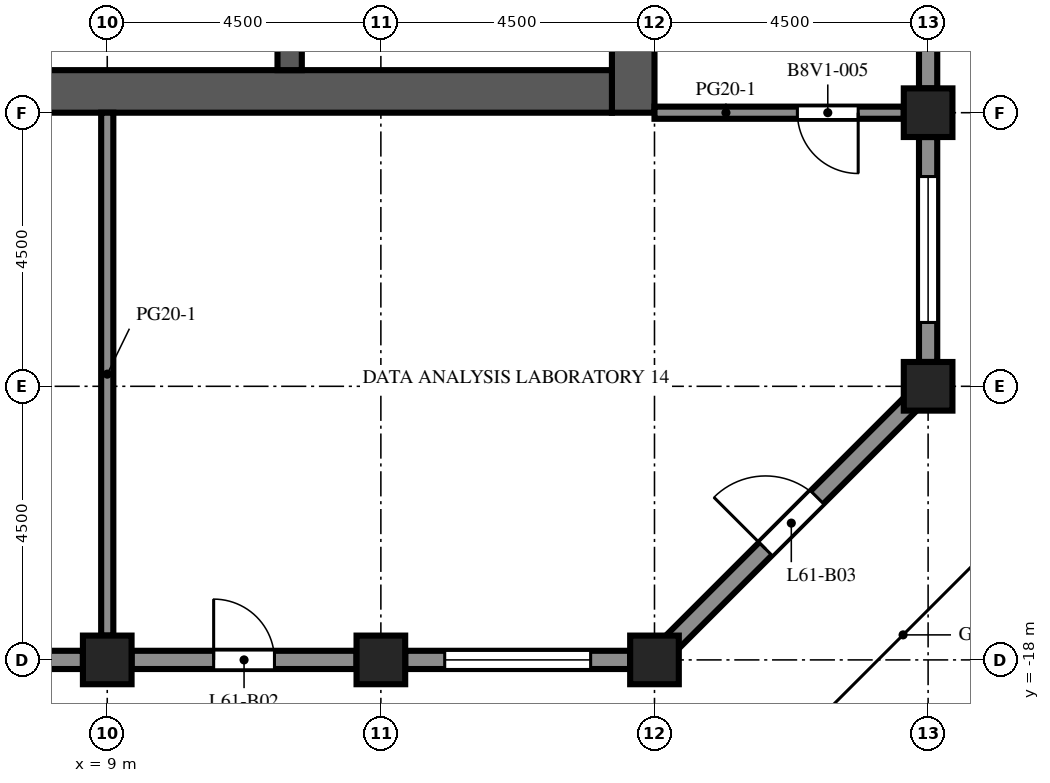
"""IFC4 building model, lengths in metres.
Left out: names, types, materials, properties, quantities, classifications, styles, units other than length and angle.
Written with IfcOpenShell. Run it as: python <this file> out.ifc"""

import sys

from ifc_helpers import new_model, si_unit, direction, frame, frame_2d, origin, origin_2d, place, context, subcontext, project, spatial, rectangle, extrude, element, fill, save


model = new_model("IFC4")
c1 = context("Model", 3, precision=1e-05, world=origin(), true_north=direction((0.0, 1.0)))
c2 = subcontext(c1, "Body", "Model", "MODEL_VIEW")
j1 = project(units=[si_unit("LENGTHUNIT", "METRE"), si_unit("PLANEANGLEUNIT", "RADIAN")], contexts=[c1])
p1 = place(None, origin())
s1 = spatial("IfcSite", under=j1, at=p1, CompositionType="ELEMENT")
p2 = place(p1, origin())
s2 = spatial("IfcBuilding", under=s1, at=p2, CompositionType="ELEMENT")
p3 = place(p2, frame((0.0, 0.0, 270.4)))
s3 = spatial("IfcBuildingStorey", under=s2, at=p3, CompositionType="ELEMENT", Elevation=270.4)
for number, where, z_axis, x_axis in (
    (1, (9.0, -18.0, 0.0), (0.0, 0.0, 1.0), (1.0, 0.0, 0.0)),
    (2, (13.5, -18.0, 0.0), (0.0, 0.0, 1.0), (1.0, 0.0, 0.0)),
    (3, (18.0, -18.0, 0.0), (0.0, 0.0, 1.0), (1.0, 0.0, 0.0)),
    (4, (22.5, -13.5, 0.0), (0.0, 0.0, 1.0), (1.0, 0.0, 0.0)),
    (5, (22.5, -9.0, 0.0), (0.0, 0.0, 1.0), (1.0, 0.0, 0.0)),
):
    element("IfcColumn", number, at=place(p3, frame(where, z_axis=z_axis, x_axis=x_axis)), inside=s3, PredefinedType="COLUMN", context=c2, shape_type="SweptSolid", body=[
        extrude(rectangle(XDim=0.8, YDim=0.8, at=origin_2d()), origin(), (0.0, 0.0, 1.0), 4.1),
    ])
p4 = place(p3, frame((17.65, -9.0, 0.0), z_axis=(0.0, 0.0, 1.0), x_axis=(0.0, 1.0, 0.0)))
e6 = element("IfcWall", 6, at=p4, inside=s3, PredefinedType="SHEAR", context=c2, shape_type="SweptSolid", body=[
    extrude(rectangle(XDim=27.5, YDim=0.7, at=frame_2d((13.75, 0.0))), origin(), (0.0, 0.0, 1.0), 4.1),
])
p5 = place(p4, frame((12.55, 0.0, 0.0)))
e7 = element("IfcOpeningElement", 7, at=p5, cuts=e6, PredefinedType="OPENING", context=c2, shape_type="SweptSolid", body=[
    extrude(rectangle(XDim=2.4, YDim=2.4, at=frame_2d((1.2, 1.2))), frame((0.0, 0.36, 0.0), z_axis=(0.0, -1.0, 0.0), x_axis=(1.0, 0.0, 0.0)), (0.0, 0.0, 1.0), 0.72),
])
p6 = place(p4, frame((6.825, 0.0, 0.0)))
e8 = element("IfcOpeningElement", 8, at=p6, cuts=e6, PredefinedType="OPENING", context=c2, shape_type="SweptSolid", body=[
    extrude(rectangle(XDim=1.2, YDim=2.1, at=frame_2d((0.6, 1.05))), frame((0.0, 0.36, 0.0), z_axis=(0.0, -1.0, 0.0), x_axis=(1.0, 0.0, 0.0)), (0.0, 0.0, 1.0), 0.72),
])
p7 = place(p4, frame((19.475, 0.0, 0.0)))
e9 = element("IfcOpeningElement", 9, at=p7, cuts=e6, PredefinedType="OPENING", context=c2, shape_type="SweptSolid", body=[
    extrude(rectangle(XDim=1.2, YDim=2.1, at=frame_2d((0.6, 1.05))), frame((0.0, 0.36, 0.0), z_axis=(0.0, -1.0, 0.0), x_axis=(1.0, 0.0, 0.0)), (0.0, 0.0, 1.0), 0.72),
])
p8 = place(p3, frame((6.7, -8.65, 0.0), z_axis=(0.0, 0.0, 1.0), x_axis=(1.0, 0.0, 0.0)))
e10 = element("IfcWall", 10, at=p8, inside=s3, PredefinedType="SHEAR", context=c2, shape_type="SweptSolid", body=[
    extrude(rectangle(XDim=10.6, YDim=0.7, at=frame_2d((5.3, 0.0))), origin(), (0.0, 0.0, 1.0), 4.1),
])
p9 = place(p3, frame((12.0, -8.3, 0.0), z_axis=(0.0, 0.0, 1.0), x_axis=(0.0, 1.0, 0.0)))
e11 = element("IfcWall", 11, at=p9, inside=s3, PredefinedType="SHEAR", context=c2, shape_type="SweptSolid", body=[
    extrude(rectangle(XDim=7.6, YDim=0.4, at=frame_2d((3.8, 0.0))), origin(), (0.0, 0.0, 1.0), 4.1),
])
p10 = place(p3, frame((8.6, -18.0, 0.0), z_axis=(0.0, 0.0, 1.0), x_axis=(-1.0, 0.0, 0.0)))
e12 = element("IfcWall", 12, at=p10, inside=s3, PredefinedType="SOLIDWALL", context=c2, shape_type="SweptSolid", body=[
    extrude(rectangle(XDim=3.7, YDim=0.3, at=frame_2d((1.85, 0.0))), origin(), (0.0, 0.0, 1.0), 2.85),
])
p11 = place(p10, frame((0.65, 0.0, 0.8)))
e13 = element("IfcOpeningElement", 13, at=p11, cuts=e12, PredefinedType="OPENING", context=c2, shape_type="SweptSolid", body=[
    extrude(rectangle(XDim=2.4, YDim=1.7, at=frame_2d((1.2, 0.85))), frame((0.0, 0.16, 0.0), z_axis=(0.0, -1.0, 0.0), x_axis=(1.0, 0.0, 0.0)), (0.0, 0.0, 1.0), 0.32),
])
p12 = place(p3, frame((13.1, -18.0, 0.0), z_axis=(0.0, 0.0, 1.0), x_axis=(-1.0, 0.0, 0.0)))
e14 = element("IfcWall", 14, at=p12, inside=s3, PredefinedType="SOLIDWALL", context=c2, shape_type="SweptSolid", body=[
    extrude(rectangle(XDim=3.7, YDim=0.3, at=frame_2d((1.85, 0.0))), origin(), (0.0, 0.0, 1.0), 2.85),
])
p13 = place(p12, frame((1.35, 0.0, 0.0)))
e15 = element("IfcOpeningElement", 15, at=p13, cuts=e14, PredefinedType="OPENING", context=c2, shape_type="SweptSolid", body=[
    extrude(rectangle(XDim=1.0, YDim=2.2, at=frame_2d((0.5, 1.1))), frame((0.0, 0.16, 0.0), z_axis=(0.0, -1.0, 0.0), x_axis=(1.0, 0.0, 0.0)), (0.0, 0.0, 1.0), 0.32),
])
p14 = place(p3, frame((17.6, -18.0, 0.0), z_axis=(0.0, 0.0, 1.0), x_axis=(-1.0, 0.0, 0.0)))
e16 = element("IfcWall", 16, at=p14, inside=s3, PredefinedType="SOLIDWALL", context=c2, shape_type="SweptSolid", body=[
    extrude(rectangle(XDim=3.7, YDim=0.3, at=frame_2d((1.85, 0.0))), origin(), (0.0, 0.0, 1.0), 2.85),
])
p15 = place(p14, frame((0.65, 0.0, 0.8)))
e17 = element("IfcOpeningElement", 17, at=p15, cuts=e16, PredefinedType="OPENING", context=c2, shape_type="SweptSolid", body=[
    extrude(rectangle(XDim=2.4, YDim=1.7, at=frame_2d((1.2, 0.85))), frame((0.0, 0.16, 0.0), z_axis=(0.0, -1.0, 0.0), x_axis=(1.0, 0.0, 0.0)), (0.0, 0.0, 1.0), 0.32),
])
p16 = place(p3, frame((22.206, -13.794, 0.0), z_axis=(0.0, 0.0, 1.0), x_axis=(-0.707106781187, -0.707106781187, 0.0)))
e18 = element("IfcWall", 18, at=p16, inside=s3, PredefinedType="SOLIDWALL", context=c2, shape_type="SweptSolid", body=[
    extrude(rectangle(XDim=5.532, YDim=0.3, at=frame_2d((2.766, 0.0))), origin(), (0.0, 0.0, 1.0), 2.85),
])
p17 = place(p16, frame((2.166, 0.0, 0.0)))
e19 = element("IfcOpeningElement", 19, at=p17, cuts=e18, PredefinedType="OPENING", context=c2, shape_type="SweptSolid", body=[
    extrude(rectangle(XDim=1.2, YDim=2.2, at=frame_2d((0.6, 1.1))), frame((0.0, 0.16, 0.0), z_axis=(0.0, -1.0, 0.0), x_axis=(1.0, 0.0, 0.0)), (0.0, 0.0, 1.0), 0.32),
])
p18 = place(p3, frame((22.5, -9.4, 0.0), z_axis=(0.0, 0.0, 1.0), x_axis=(0.0, -1.0, 0.0)))
e20 = element("IfcWall", 20, at=p18, inside=s3, PredefinedType="SOLIDWALL", context=c2, shape_type="SweptSolid", body=[
    extrude(rectangle(XDim=3.7, YDim=0.3, at=frame_2d((1.85, 0.0))), origin(), (0.0, 0.0, 1.0), 2.85),
])
p19 = place(p18, frame((0.65, 0.0, 0.8)))
e21 = element("IfcOpeningElement", 21, at=p19, cuts=e20, PredefinedType="OPENING", context=c2, shape_type="SweptSolid", body=[
    extrude(rectangle(XDim=2.4, YDim=1.7, at=frame_2d((1.2, 0.85))), frame((0.0, 0.16, 0.0), z_axis=(0.0, -1.0, 0.0), x_axis=(1.0, 0.0, 0.0)), (0.0, 0.0, 1.0), 0.32),
])
p20 = place(p3, frame((22.5, -4.9, 0.0), z_axis=(0.0, 0.0, 1.0), x_axis=(0.0, -1.0, 0.0)))
e22 = element("IfcWall", 22, at=p20, inside=s3, PredefinedType="SOLIDWALL", context=c2, shape_type="SweptSolid", body=[
    extrude(rectangle(XDim=3.7, YDim=0.3, at=frame_2d((1.85, 0.0))), origin(), (0.0, 0.0, 1.0), 2.85),
])
p21 = place(p20, frame((1.35, 0.0, 0.0)))
e23 = element("IfcOpeningElement", 23, at=p21, cuts=e22, PredefinedType="OPENING", context=c2, shape_type="SweptSolid", body=[
    extrude(rectangle(XDim=1.0, YDim=2.2, at=frame_2d((0.5, 1.1))), frame((0.0, 0.16, 0.0), z_axis=(0.0, -1.0, 0.0), x_axis=(1.0, 0.0, 0.0)), (0.0, 0.0, 1.0), 0.32),
])
p22 = place(p3, frame((9.0, -17.6, 0.0), z_axis=(0.0, 0.0, 1.0), x_axis=(0.0, 1.0, 0.0)))
e24 = element("IfcWall", 24, at=p22, inside=s3, PredefinedType="PARTITIONING", context=c2, shape_type="SweptSolid", body=[
    extrude(rectangle(XDim=8.6, YDim=0.2, at=frame_2d((4.3, 0.0))), origin(), (0.0, 0.0, 1.0), 3.65),
])
p23 = place(p3, frame((22.1, -9.0, 0.0), z_axis=(0.0, 0.0, 1.0), x_axis=(-1.0, 0.0, 0.0)))
e25 = element("IfcWall", 25, at=p23, inside=s3, PredefinedType="PARTITIONING", context=c2, shape_type="SweptSolid", body=[
    extrude(rectangle(XDim=4.1, YDim=0.2, at=frame_2d((2.05, 0.0))), origin(), (0.0, 0.0, 1.0), 3.65),
])
p24 = place(p23, frame((0.75, 0.0, 0.0)))
e26 = element("IfcOpeningElement", 26, at=p24, cuts=e25, PredefinedType="OPENING", context=c2, shape_type="SweptSolid", body=[
    extrude(rectangle(XDim=1.0, YDim=2.1, at=frame_2d((0.5, 1.05))), frame((0.0, 0.11, 0.0), z_axis=(0.0, -1.0, 0.0), x_axis=(1.0, 0.0, 0.0)), (0.0, 0.0, 1.0), 0.22),
])
p25 = place(p13, origin())
e27 = element("IfcDoor", 27, at=p25, inside=s3, OperationType="SINGLE_SWING_RIGHT", PredefinedType="DOOR", context=c2, shape_type="SweptSolid", body=[
    extrude(rectangle(XDim=1.0, YDim=2.2, at=frame_2d((0.5, 1.1))), frame((0.0, 0.025, 0.0), z_axis=(0.0, -1.0, 0.0), x_axis=(1.0, 0.0, 0.0)), (0.0, 0.0, 1.0), 0.05),
])
fill(e15, e27)
p26 = place(p15, origin())
e28 = element("IfcWindow", 28, at=p26, inside=s3, PartitioningType="SINGLE_PANEL", PredefinedType="WINDOW", context=c2, shape_type="SweptSolid", body=[
    extrude(rectangle(XDim=2.4, YDim=1.7, at=frame_2d((1.2, 0.85))), frame((0.0, 0.03, 0.0), z_axis=(0.0, -1.0, 0.0), x_axis=(1.0, 0.0, 0.0)), (0.0, 0.0, 1.0), 0.06),
])
fill(e17, e28)
p27 = place(p17, origin())
e29 = element("IfcDoor", 29, at=p27, inside=s3, OperationType="SINGLE_SWING_RIGHT", PredefinedType="DOOR", context=c2, shape_type="SweptSolid", body=[
    extrude(rectangle(XDim=1.2, YDim=2.2, at=frame_2d((0.6, 1.1))), frame((0.0, 0.025, 0.0), z_axis=(0.0, -1.0, 0.0), x_axis=(1.0, 0.0, 0.0)), (0.0, 0.0, 1.0), 0.05),
])
fill(e19, e29)
p28 = place(p19, origin())
e30 = element("IfcWindow", 30, at=p28, inside=s3, PartitioningType="SINGLE_PANEL", PredefinedType="WINDOW", context=c2, shape_type="SweptSolid", body=[
    extrude(rectangle(XDim=2.4, YDim=1.7, at=frame_2d((1.2, 0.85))), frame((0.0, 0.03, 0.0), z_axis=(0.0, -1.0, 0.0), x_axis=(1.0, 0.0, 0.0)), (0.0, 0.0, 1.0), 0.06),
])
fill(e21, e30)
p29 = place(p24, origin())
e31 = element("IfcDoor", 31, at=p29, inside=s3, OperationType="SINGLE_SWING_LEFT", PredefinedType="DOOR", context=c2, shape_type="SweptSolid", body=[
    extrude(rectangle(XDim=1.0, YDim=2.1, at=frame_2d((0.5, 1.05))), frame((0.0, 0.025, 0.0), z_axis=(0.0, -1.0, 0.0), x_axis=(1.0, 0.0, 0.0)), (0.0, 0.0, 1.0), 0.05),
])
fill(e26, e31)
save(model, sys.argv[1])
